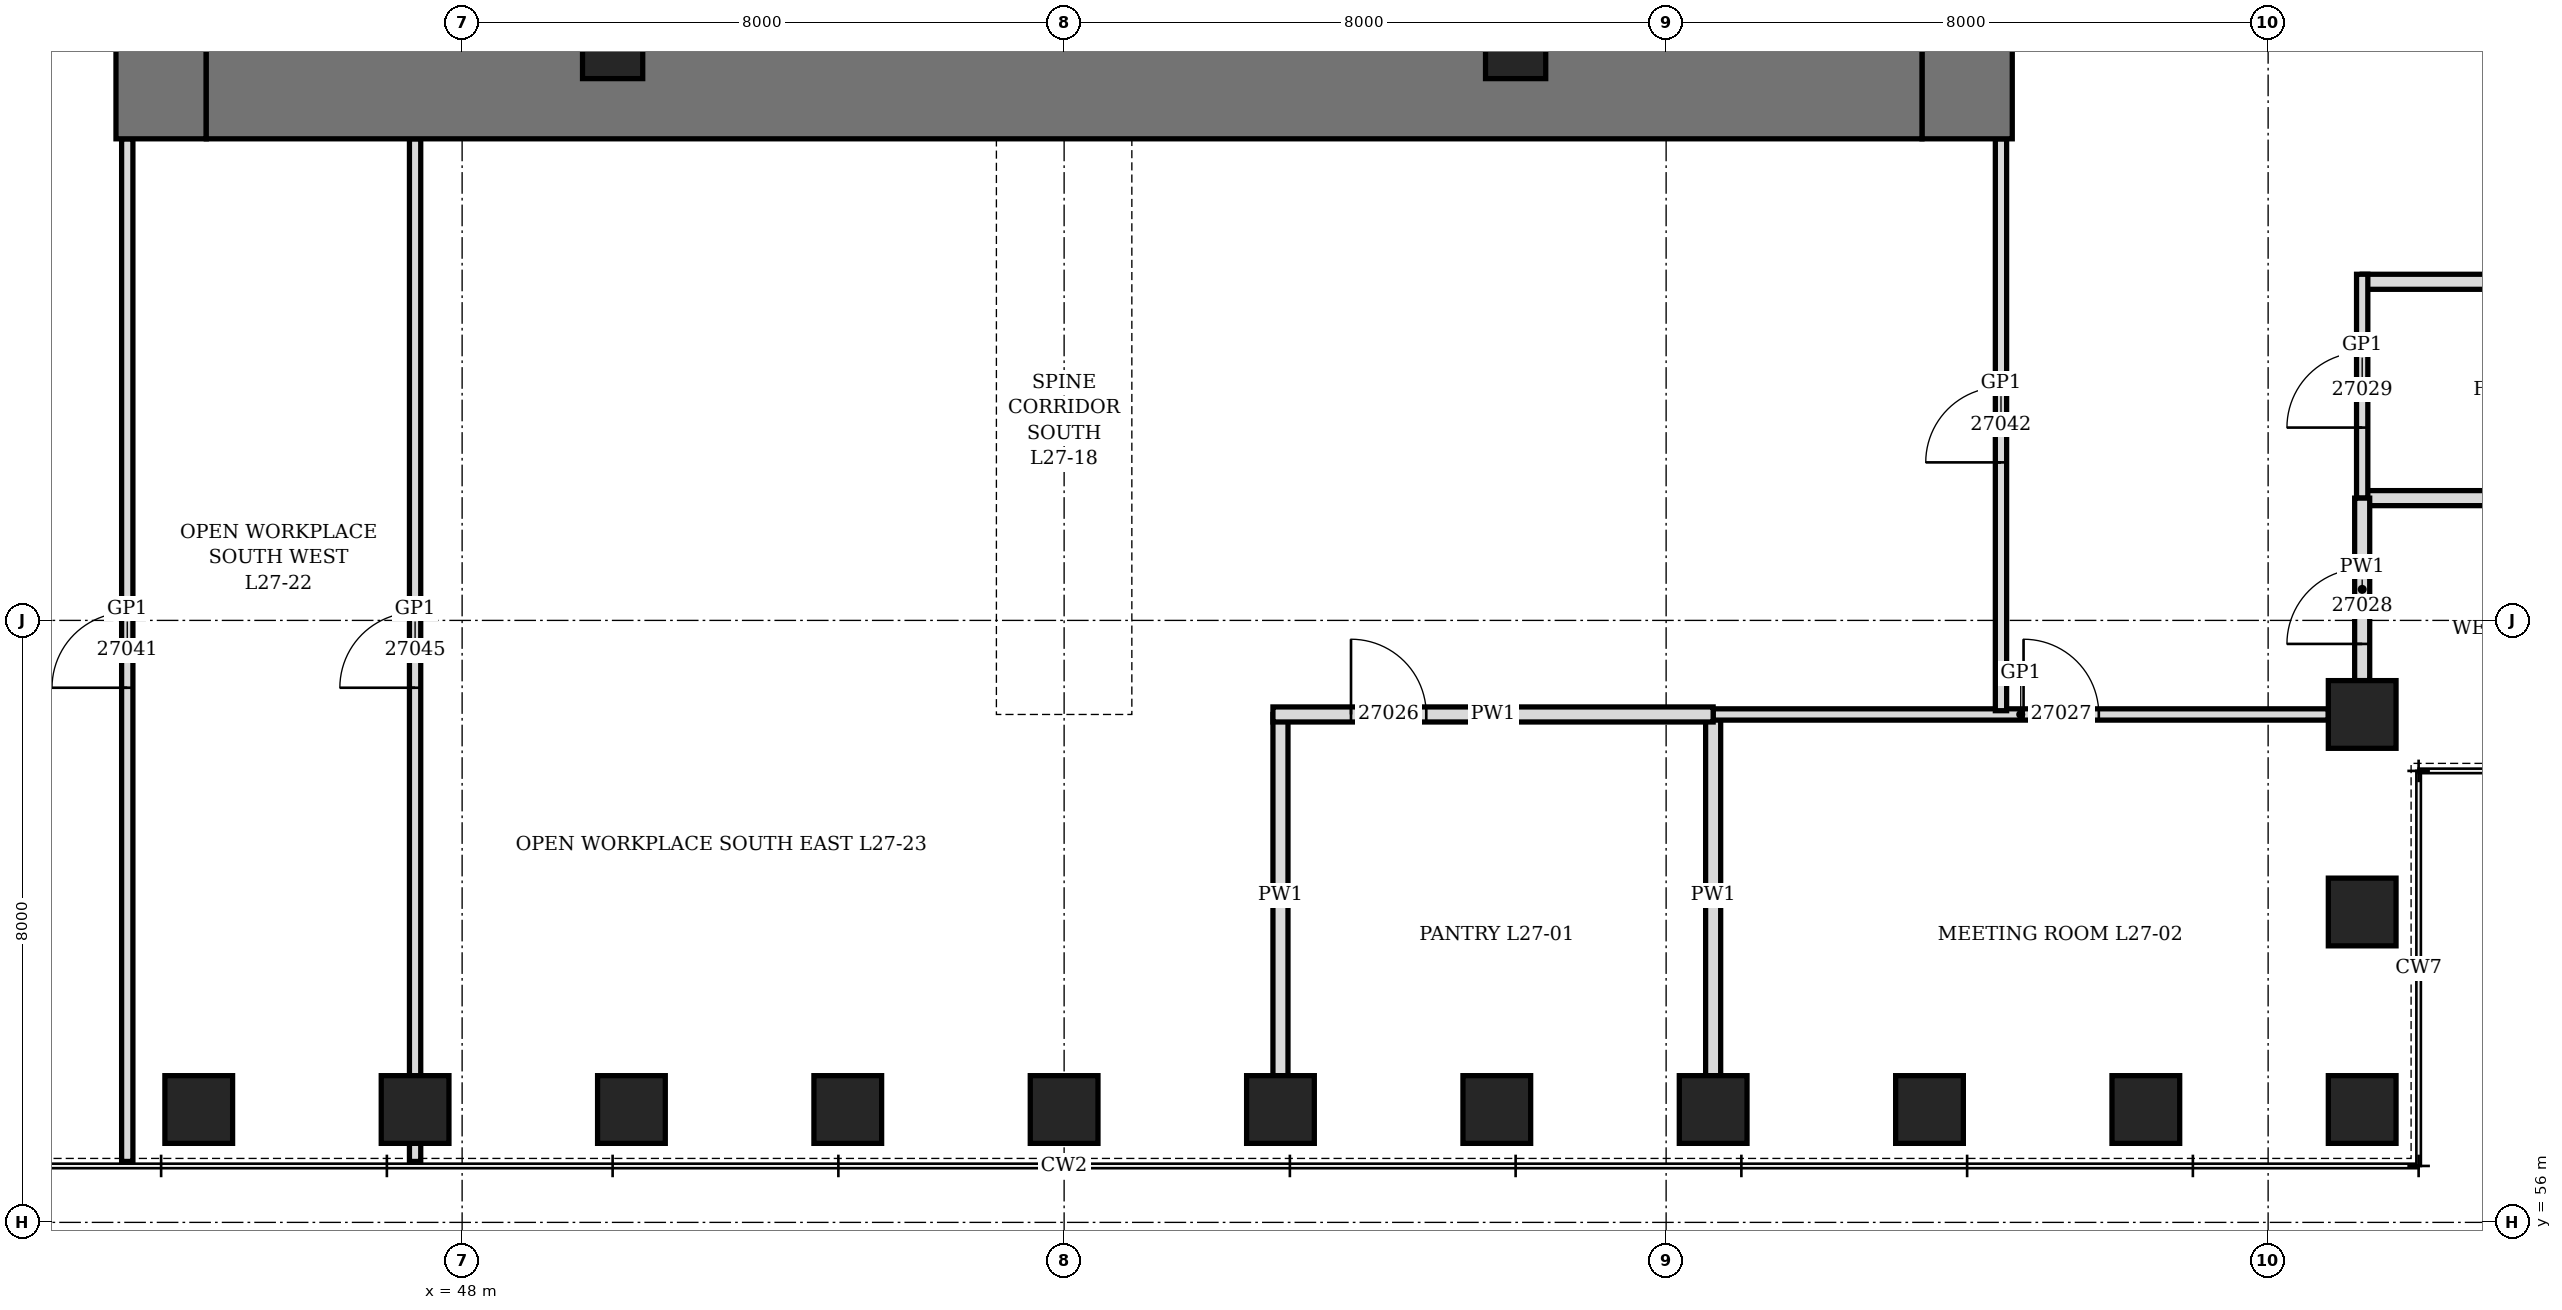
"""IFC4 building model, lengths in metres.
Left out: names, types, materials, properties, quantities, classifications, styles, units other than length and angle.
Written with IfcOpenShell. Run it as: python <this file> out.ifc"""

import sys

from ifc_helpers import new_model, si_unit, direction, frame, frame_2d, origin, origin_2d, place, context, subcontext, project, spatial, rectangle, hollow_rectangle, extrude, element, fill, save


model = new_model("IFC4")
c1 = context("Model", 3, precision=1e-05, world=origin(), true_north=direction((0.0, 1.0)))
c2 = subcontext(c1, "Body", "Model", "MODEL_VIEW")
j1 = project(units=[si_unit("LENGTHUNIT", "METRE"), si_unit("PLANEANGLEUNIT", "RADIAN")], contexts=[c1])
p1 = place(None, origin())
s1 = spatial("IfcSite", under=j1, at=p1, CompositionType="ELEMENT")
p2 = place(p1, origin())
s2 = spatial("IfcBuilding", under=s1, at=p2, CompositionType="ELEMENT")
p3 = place(p2, frame((0.0, 0.0, 124.9)))
s3 = spatial("IfcBuildingStorey", under=s2, at=p3, CompositionType="ELEMENT", Elevation=124.9)
for number, where, z_axis, x_axis in (
    (1, (44.5, 57.5, 0.0), (0.0, 0.0, 1.0), (1.0, 0.0, 0.0)),
    (2, (47.375, 57.5, 0.0), (0.0, 0.0, 1.0), (1.0, 0.0, 0.0)),
    (3, (50.25, 57.5, 0.0), (0.0, 0.0, 1.0), (1.0, 0.0, 0.0)),
    (4, (53.125, 57.5, 0.0), (0.0, 0.0, 1.0), (1.0, 0.0, 0.0)),
    (5, (56.0, 57.5, 0.0), (0.0, 0.0, 1.0), (1.0, 0.0, 0.0)),
    (6, (58.875, 57.5, 0.0), (0.0, 0.0, 1.0), (1.0, 0.0, 0.0)),
    (7, (61.75, 57.5, 0.0), (0.0, 0.0, 1.0), (1.0, 0.0, 0.0)),
    (8, (64.625, 57.5, 0.0), (0.0, 0.0, 1.0), (1.0, 0.0, 0.0)),
    (9, (67.5, 57.5, 0.0), (0.0, 0.0, 1.0), (1.0, 0.0, 0.0)),
    (10, (70.375, 57.5, 0.0), (0.0, 0.0, 1.0), (1.0, 0.0, 0.0)),
    (11, (73.25, 57.5, 0.0), (0.0, 0.0, 1.0), (0.0, 1.0, 0.0)),
    (12, (73.25, 60.125, 0.0), (0.0, 0.0, 1.0), (0.0, 1.0, 0.0)),
    (13, (73.25, 62.75, 0.0), (0.0, 0.0, 1.0), (1.0, 0.0, 0.0)),
):
    element("IfcColumn", number, at=place(p3, frame(where, z_axis=z_axis, x_axis=x_axis)), inside=s3, PredefinedType="COLUMN", context=c2, shape_type="SweptSolid", body=[
        extrude(hollow_rectangle(XDim=0.9, YDim=0.9, WallThickness=0.15, at=origin_2d()), origin(), (0.0, 0.0, 1.0), 4.2),
    ])
p4 = place(p3, frame((44.0, 70.4, 0.0), z_axis=(0.0, 0.0, 1.0), x_axis=(0.0, 1.0, 0.0)))
e14 = element("IfcWall", 14, at=p4, inside=s3, PredefinedType="SHEAR", context=c2, shape_type="SweptSolid", body=[
    extrude(rectangle(XDim=19.2, YDim=1.2, at=frame_2d((9.6, 0.0))), origin(), (0.0, 0.0, 1.0), 4.2),
])
p5 = place(p4, frame((8.6, 0.0, 0.0)))
e15 = element("IfcOpeningElement", 15, at=p5, cuts=e14, PredefinedType="OPENING", context=c2, shape_type="SweptSolid", body=[
    extrude(rectangle(XDim=2.0, YDim=2.4, at=frame_2d((1.0, 1.2))), frame((0.0, 0.61, 0.0), z_axis=(0.0, -1.0, 0.0), x_axis=(1.0, 0.0, 0.0)), (0.0, 0.0, 1.0), 1.22),
])
p6 = place(p3, frame((68.0, 70.4, 0.0), z_axis=(0.0, 0.0, 1.0), x_axis=(0.0, 1.0, 0.0)))
e16 = element("IfcWall", 16, at=p6, inside=s3, PredefinedType="SHEAR", context=c2, shape_type="SweptSolid", body=[
    extrude(rectangle(XDim=19.2, YDim=1.2, at=frame_2d((9.6, 0.0))), origin(), (0.0, 0.0, 1.0), 4.2),
])
p7 = place(p6, frame((8.6, 0.0, 0.0)))
e17 = element("IfcOpeningElement", 17, at=p7, cuts=e16, PredefinedType="OPENING", context=c2, shape_type="SweptSolid", body=[
    extrude(rectangle(XDim=2.0, YDim=2.4, at=frame_2d((1.0, 1.2))), frame((0.0, 0.61, 0.0), z_axis=(0.0, -1.0, 0.0), x_axis=(1.0, 0.0, 0.0)), (0.0, 0.0, 1.0), 1.22),
])
p8 = place(p3, frame((44.6, 71.0, 0.0), z_axis=(0.0, 0.0, 1.0), x_axis=(1.0, 0.0, 0.0)))
e18 = element("IfcWall", 18, at=p8, inside=s3, PredefinedType="SHEAR", context=c2, shape_type="SweptSolid", body=[
    extrude(rectangle(XDim=22.8, YDim=1.2, at=frame_2d((11.4, 0.0))), origin(), (0.0, 0.0, 1.0), 4.2),
])
for number, where, z_axis, x_axis in (
    (19, (50.0, 71.6, 0.0), (0.0, 0.0, 1.0), (1.0, 0.0, 0.0)),
    (20, (62.0, 71.6, 0.0), (0.0, 0.0, 1.0), (1.0, 0.0, 0.0)),
):
    element("IfcColumn", number, at=place(p3, frame(where, z_axis=z_axis, x_axis=x_axis)), inside=s3, PredefinedType="COLUMN", context=c2, shape_type="SweptSolid", body=[
        extrude(hollow_rectangle(XDim=0.8, YDim=0.8, WallThickness=0.1, at=origin_2d()), origin(), (0.0, 0.0, 1.0), 4.2),
    ])
for number, where, z_axis, x_axis in (
    (21, (58.875, 57.95, 0.0), (0.0, 0.0, 1.0), (0.0, 1.0, 0.0)),
    (22, (64.625, 57.95, 0.0), (0.0, 0.0, 1.0), (0.0, 1.0, 0.0)),
):
    element("IfcWall", number, at=place(p3, frame(where, z_axis=z_axis, x_axis=x_axis)), inside=s3, PredefinedType="PARTITIONING", context=c2, shape_type="SweptSolid", body=[
        extrude(rectangle(XDim=4.8, YDim=0.2, at=frame_2d((2.4, 0.0))), origin(), (0.0, 0.0, 1.0), 3.278),
    ])
for number, where, z_axis, x_axis in (
    (23, (73.25, 65.625, 0.0), (0.0, 0.0, 1.0), (1.0, 0.0, 0.0)),
    (24, (73.25, 68.5, 0.0), (0.0, 0.0, 1.0), (1.0, 0.0, 0.0)),
):
    element("IfcWall", number, at=place(p3, frame(where, z_axis=z_axis, x_axis=x_axis)), inside=s3, PredefinedType="PARTITIONING", context=c2, shape_type="SweptSolid", body=[
        extrude(rectangle(XDim=4.8, YDim=0.2, at=frame_2d((2.4, 0.0))), origin(), (0.0, 0.0, 1.0), 3.428),
    ])
p9 = place(p3, frame((64.625, 62.75, 0.0), z_axis=(0.0, 0.0, 1.0), x_axis=(1.0, 0.0, 0.0)))
e25 = element("IfcWall", 25, at=p9, inside=s3, PredefinedType="PARTITIONING", context=c2, shape_type="SweptSolid", body=[
    extrude(rectangle(XDim=8.175, YDim=0.15, at=frame_2d((4.087, 0.0))), origin(), (0.0, 0.0, 1.0), 4.04),
])
p10 = place(p9, frame((4.125, 0.0, 0.0)))
e26 = element("IfcOpeningElement", 26, at=p10, cuts=e25, PredefinedType="OPENING", context=c2, shape_type="SweptSolid", body=[
    extrude(rectangle(XDim=1.0, YDim=2.4, at=frame_2d((0.5, 1.2))), frame((0.0, 0.085, 0.0), z_axis=(0.0, -1.0, 0.0), x_axis=(1.0, 0.0, 0.0)), (0.0, 0.0, 1.0), 0.17),
])
p11 = place(p3, frame((58.775, 62.75, 0.0), z_axis=(0.0, 0.0, 1.0), x_axis=(1.0, 0.0, 0.0)))
e27 = element("IfcWall", 27, at=p11, inside=s3, PredefinedType="PARTITIONING", context=c2, shape_type="SweptSolid", body=[
    extrude(rectangle(XDim=5.85, YDim=0.2, at=frame_2d((2.925, 0.0))), origin(), (0.0, 0.0, 1.0), 4.04),
])
p12 = place(p11, frame((1.038, 0.0, 0.0)))
e28 = element("IfcOpeningElement", 28, at=p12, cuts=e27, PredefinedType="OPENING", context=c2, shape_type="SweptSolid", body=[
    extrude(rectangle(XDim=1.0, YDim=2.1, at=frame_2d((0.5, 1.05))), frame((0.0, 0.11, 0.0), z_axis=(0.0, -1.0, 0.0), x_axis=(1.0, 0.0, 0.0)), (0.0, 0.0, 1.0), 0.22),
])
p13 = place(p3, frame((43.55, 56.81, 0.0), z_axis=(0.0, 0.0, 1.0), x_axis=(0.0, 1.0, 0.0)))
e29 = element("IfcWall", 29, at=p13, inside=s3, PredefinedType="PARTITIONING", context=c2, shape_type="SweptSolid", body=[
    extrude(rectangle(XDim=13.59, YDim=0.15, at=frame_2d((6.795, 0.0))), origin(), (0.0, 0.0, 1.0), 4.04),
])
p14 = place(p13, frame((6.295, 0.0, 0.0)))
e30 = element("IfcOpeningElement", 30, at=p14, cuts=e29, PredefinedType="OPENING", context=c2, shape_type="SweptSolid", body=[
    extrude(rectangle(XDim=1.0, YDim=2.4, at=frame_2d((0.5, 1.2))), frame((0.0, 0.085, 0.0), z_axis=(0.0, -1.0, 0.0), x_axis=(1.0, 0.0, 0.0)), (0.0, 0.0, 1.0), 0.17),
])
p15 = place(p3, frame((47.375, 56.81, 0.0), z_axis=(0.0, 0.0, 1.0), x_axis=(0.0, 1.0, 0.0)))
e31 = element("IfcWall", 31, at=p15, inside=s3, PredefinedType="PARTITIONING", context=c2, shape_type="SweptSolid", body=[
    extrude(rectangle(XDim=13.59, YDim=0.15, at=frame_2d((6.795, 0.0))), origin(), (0.0, 0.0, 1.0), 3.278),
])
p16 = place(p15, frame((6.295, 0.0, 0.0)))
e32 = element("IfcOpeningElement", 32, at=p16, cuts=e31, PredefinedType="OPENING", context=c2, shape_type="SweptSolid", body=[
    extrude(rectangle(XDim=1.0, YDim=2.4, at=frame_2d((0.5, 1.2))), frame((0.0, 0.085, 0.0), z_axis=(0.0, -1.0, 0.0), x_axis=(1.0, 0.0, 0.0)), (0.0, 0.0, 1.0), 0.17),
])
p17 = place(p3, frame((68.45, 62.8, 0.0), z_axis=(0.0, 0.0, 1.0), x_axis=(0.0, 1.0, 0.0)))
e33 = element("IfcWall", 33, at=p17, inside=s3, PredefinedType="PARTITIONING", context=c2, shape_type="SweptSolid", body=[
    extrude(rectangle(XDim=7.6, YDim=0.15, at=frame_2d((3.8, 0.0))), origin(), (0.0, 0.0, 1.0), 4.04),
])
p18 = place(p17, frame((3.3, 0.0, 0.0)))
e34 = element("IfcOpeningElement", 34, at=p18, cuts=e33, PredefinedType="OPENING", context=c2, shape_type="SweptSolid", body=[
    extrude(rectangle(XDim=1.0, YDim=2.4, at=frame_2d((0.5, 1.2))), frame((0.0, 0.085, 0.0), z_axis=(0.0, -1.0, 0.0), x_axis=(1.0, 0.0, 0.0)), (0.0, 0.0, 1.0), 0.17),
])
p19 = place(p3, frame((73.25, 65.625, 0.0), z_axis=(0.0, 0.0, 1.0), x_axis=(0.0, 1.0, 0.0)))
e35 = element("IfcWall", 35, at=p19, inside=s3, PredefinedType="PARTITIONING", context=c2, shape_type="SweptSolid", body=[
    extrude(rectangle(XDim=2.975, YDim=0.15, at=frame_2d((1.488, 0.0))), origin(), (0.0, 0.0, 1.0), 4.04),
])
p20 = place(p19, frame((0.938, 0.0, 0.0)))
e36 = element("IfcOpeningElement", 36, at=p20, cuts=e35, PredefinedType="OPENING", context=c2, shape_type="SweptSolid", body=[
    extrude(rectangle(XDim=1.0, YDim=2.4, at=frame_2d((0.5, 1.2))), frame((0.0, 0.085, 0.0), z_axis=(0.0, -1.0, 0.0), x_axis=(1.0, 0.0, 0.0)), (0.0, 0.0, 1.0), 0.17),
])
p21 = place(p3, frame((73.25, 63.2, 0.0), z_axis=(0.0, 0.0, 1.0), x_axis=(0.0, 1.0, 0.0)))
e37 = element("IfcWall", 37, at=p21, inside=s3, PredefinedType="PARTITIONING", context=c2, shape_type="SweptSolid", body=[
    extrude(rectangle(XDim=2.425, YDim=0.2, at=frame_2d((1.212, 0.0))), origin(), (0.0, 0.0, 1.0), 4.04),
])
p22 = place(p21, frame((0.488, 0.0, 0.0)))
e38 = element("IfcOpeningElement", 38, at=p22, cuts=e37, PredefinedType="OPENING", context=c2, shape_type="SweptSolid", body=[
    extrude(rectangle(XDim=1.0, YDim=2.1, at=frame_2d((0.5, 1.05))), frame((0.0, 0.11, 0.0), z_axis=(0.0, -1.0, 0.0), x_axis=(1.0, 0.0, 0.0)), (0.0, 0.0, 1.0), 0.22),
])
p23 = place(p12, origin())
e39 = element("IfcDoor", 39, at=p23, inside=s3, OperationType="SINGLE_SWING_LEFT", PredefinedType="DOOR", context=c2, shape_type="SweptSolid", body=[
    extrude(rectangle(XDim=1.0, YDim=2.1, at=frame_2d((0.5, 1.05))), frame((0.0, 0.1, 0.0), z_axis=(0.0, -1.0, 0.0), x_axis=(1.0, 0.0, 0.0)), (0.0, 0.0, 1.0), 0.199),
])
fill(e28, e39)
p24 = place(p10, origin())
e40 = element("IfcDoor", 40, at=p24, inside=s3, OperationType="SINGLE_SWING_RIGHT", PredefinedType="DOOR", context=c2, shape_type="SweptSolid", body=[
    extrude(rectangle(XDim=1.0, YDim=2.4, at=frame_2d((0.5, 1.2))), frame((0.0, 0.075, 0.0), z_axis=(0.0, -1.0, 0.0), x_axis=(1.0, 0.0, 0.0)), (0.0, 0.0, 1.0), 0.149),
])
fill(e26, e40)
p25 = place(p22, origin())
e41 = element("IfcDoor", 41, at=p25, inside=s3, OperationType="SINGLE_SWING_LEFT", PredefinedType="DOOR", context=c2, shape_type="SweptSolid", body=[
    extrude(rectangle(XDim=1.0, YDim=2.1, at=frame_2d((0.5, 1.05))), frame((0.0, 0.1, 0.0), z_axis=(0.0, -1.0, 0.0), x_axis=(1.0, 0.0, 0.0)), (0.0, 0.0, 1.0), 0.199),
])
fill(e38, e41)
p26 = place(p20, origin())
e42 = element("IfcDoor", 42, at=p26, inside=s3, OperationType="SINGLE_SWING_RIGHT", PredefinedType="DOOR", context=c2, shape_type="SweptSolid", body=[
    extrude(rectangle(XDim=1.0, YDim=2.4, at=frame_2d((0.5, 1.2))), frame((0.0, 0.075, 0.0), z_axis=(0.0, -1.0, 0.0), x_axis=(1.0, 0.0, 0.0)), (0.0, 0.0, 1.0), 0.149),
])
fill(e36, e42)
p27 = place(p14, origin())
e43 = element("IfcDoor", 43, at=p27, inside=s3, OperationType="SINGLE_SWING_RIGHT", PredefinedType="DOOR", context=c2, shape_type="SweptSolid", body=[
    extrude(rectangle(XDim=1.0, YDim=2.4, at=frame_2d((0.5, 1.2))), frame((0.0, 0.075, 0.0), z_axis=(0.0, -1.0, 0.0), x_axis=(1.0, 0.0, 0.0)), (0.0, 0.0, 1.0), 0.149),
])
fill(e30, e43)
p28 = place(p18, origin())
e44 = element("IfcDoor", 44, at=p28, inside=s3, OperationType="SINGLE_SWING_RIGHT", PredefinedType="DOOR", context=c2, shape_type="SweptSolid", body=[
    extrude(rectangle(XDim=1.0, YDim=2.4, at=frame_2d((0.5, 1.2))), frame((0.0, 0.075, 0.0), z_axis=(0.0, -1.0, 0.0), x_axis=(1.0, 0.0, 0.0)), (0.0, 0.0, 1.0), 0.149),
])
fill(e34, e44)
p29 = place(p16, origin())
e45 = element("IfcDoor", 45, at=p29, inside=s3, OperationType="SINGLE_SWING_RIGHT", PredefinedType="DOOR", context=c2, shape_type="SweptSolid", body=[
    extrude(rectangle(XDim=1.0, YDim=2.4, at=frame_2d((0.5, 1.2))), frame((0.0, 0.075, 0.0), z_axis=(0.0, -1.0, 0.0), x_axis=(1.0, 0.0, 0.0)), (0.0, 0.0, 1.0), 0.149),
])
fill(e32, e45)
save(model, sys.argv[1])
